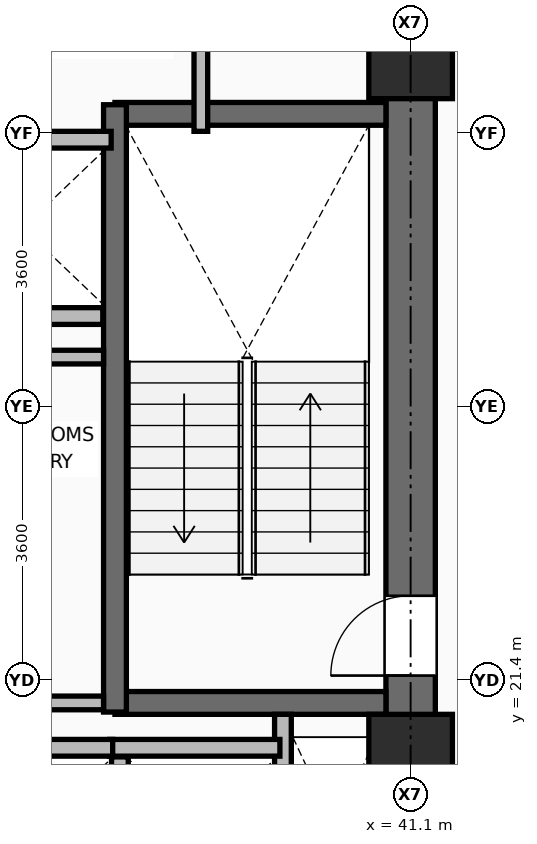
"""IFC4 building model, lengths in metres.
Left out: names, types, materials, properties, quantities, classifications, styles, units other than length and angle.
Written with IfcOpenShell. Run it as: python <this file> out.ifc"""

import sys

from ifc_helpers import new_model, si_unit, direction, frame, frame_2d, origin, origin_2d, place, context, subcontext, project, spatial, rectangle, extrude, element, fill, save


model = new_model("IFC4")
c1 = context("Model", 3, precision=1e-05, world=origin(), true_north=direction((0.0, 1.0)))
c2 = subcontext(c1, "Body", "Model", "MODEL_VIEW")
j1 = project(units=[si_unit("LENGTHUNIT", "METRE"), si_unit("PLANEANGLEUNIT", "RADIAN")], contexts=[c1])
p1 = place(None, origin())
s1 = spatial("IfcSite", under=j1, at=p1, CompositionType="ELEMENT")
p2 = place(p1, origin())
s2 = spatial("IfcBuilding", under=s1, at=p2, CompositionType="ELEMENT")
p3 = place(p2, frame((0.0, 0.0, 49.5)))
s3 = spatial("IfcBuildingStorey", under=s2, at=p3, CompositionType="ELEMENT", Elevation=49.5)
for number, where, z_axis, x_axis in (
    (1, (41.1, 20.4, 0.0), (0.0, 0.0, 1.0), (1.0, 0.0, 0.0)),
    (2, (41.1, 29.6, 0.0), (0.0, 0.0, 1.0), (1.0, 0.0, 0.0)),
):
    element("IfcColumn", number, at=place(p3, frame(where, z_axis=z_axis, x_axis=x_axis)), inside=s3, PredefinedType="COLUMN", context=c2, shape_type="SweptSolid", body=[
        extrude(rectangle(XDim=1.1, YDim=1.1, at=origin_2d()), origin(), (0.0, 0.0, 1.0), 3.75),
    ])
p4 = place(p3, frame((37.275, 18.08, 0.0), z_axis=(0.0, 0.0, 1.0), x_axis=(0.0, 1.0, 0.0)))
e3 = element("IfcWall", 3, at=p4, inside=s3, PredefinedType="PARTITIONING", context=c2, shape_type="SweptSolid", body=[
    extrude(rectangle(XDim=2.31, YDim=0.22, at=frame_2d((1.155, 0.0))), origin(), (0.0, 0.0, 1.0), 3.545),
])
p5 = place(p3, frame((34.91, 26.19, 0.0), z_axis=(0.0, 0.0, 1.0), x_axis=(1.0, 0.0, 0.0)))
e4 = element("IfcWall", 4, at=p5, inside=s3, PredefinedType="PARTITIONING", context=c2, shape_type="SweptSolid", body=[
    extrude(rectangle(XDim=2.14, YDim=0.22, at=frame_2d((1.07, 0.0))), origin(), (0.0, 0.0, 1.0), 3.545),
])
p6 = place(p3, frame((41.1, 18.125, 0.0), z_axis=(0.0, 0.0, 1.0), x_axis=(0.0, 1.0, 0.0)))
e5 = element("IfcWall", 5, at=p6, inside=s3, PredefinedType="SHEAR", context=c2, shape_type="SweptSolid", body=[
    extrude(rectangle(XDim=14.0, YDim=0.65, at=frame_2d((7.0, 0.0))), origin(), (0.0, 0.0, 1.0), 3.57),
])
p7 = place(p6, frame((3.335, 0.0, 0.0)))
e6 = element("IfcOpeningElement", 6, at=p7, cuts=e5, PredefinedType="OPENING", context=c2, shape_type="SweptSolid", body=[
    extrude(rectangle(XDim=1.05, YDim=2.1, at=frame_2d((0.525, 1.05))), frame((0.0, 0.335, 0.0), z_axis=(0.0, -1.0, 0.0), x_axis=(1.0, 0.0, 0.0)), (0.0, 0.0, 1.0), 0.67),
])
for number, where, z_axis, x_axis in (
    (7, (37.21, 21.1, 0.0), (0.0, 0.0, 1.0), (1.0, 0.0, 0.0)),
    (8, (37.21, 28.85, 0.0), (0.0, 0.0, 1.0), (1.0, 0.0, 0.0)),
):
    element("IfcWall", number, at=place(p3, frame(where, z_axis=z_axis, x_axis=x_axis)), inside=s3, PredefinedType="SHEAR", context=c2, shape_type="SweptSolid", body=[
        extrude(rectangle(XDim=3.565, YDim=0.3, at=frame_2d((1.782, 0.0))), origin(), (0.0, 0.0, 1.0), 3.57),
    ])
p8 = place(p3, frame((37.21, 20.98, 0.0), z_axis=(0.0, 0.0, 1.0), x_axis=(0.0, 1.0, 0.0)))
e9 = element("IfcWall", 9, at=p8, inside=s3, PredefinedType="SHEAR", context=c2, shape_type="SweptSolid", body=[
    extrude(rectangle(XDim=7.99, YDim=0.3, at=frame_2d((3.995, 0.0))), origin(), (0.0, 0.0, 1.0), 3.57),
])
p9 = place(p3, frame((39.42, 18.125, 0.0), z_axis=(0.0, 0.0, 1.0), x_axis=(0.0, 1.0, 0.0)))
e10 = element("IfcWall", 10, at=p9, inside=s3, PredefinedType="PARTITIONING", context=c2, shape_type="SweptSolid", body=[
    extrude(rectangle(XDim=2.825, YDim=0.22, at=frame_2d((1.413, 0.0))), origin(), (0.0, 0.0, 1.0), 3.55),
])
for number, where, z_axis, x_axis in (
    (11, (37.14, 20.51, 0.0), (0.0, 0.0, 1.0), (1.0, 0.0, 0.0)),
    (12, (34.94, 20.51, 0.0), (0.0, 0.0, 1.0), (1.0, 0.0, 0.0)),
):
    element("IfcWall", number, at=place(p3, frame(where, z_axis=z_axis, x_axis=x_axis)), inside=s3, PredefinedType="PARTITIONING", context=c2, shape_type="SweptSolid", body=[
        extrude(rectangle(XDim=2.24, YDim=0.22, at=frame_2d((1.12, 0.0))), origin(), (0.0, 0.0, 1.0), 3.55),
    ])
p10 = place(p3, frame((35.56, 28.51, 0.0), z_axis=(0.0, 0.0, 1.0), x_axis=(1.0, 0.0, 0.0)))
e13 = element("IfcWall", 13, at=p10, inside=s3, PredefinedType="PARTITIONING", context=c2, shape_type="SweptSolid", body=[
    extrude(rectangle(XDim=1.6, YDim=0.22, at=frame_2d((0.8, 0.0))), origin(), (0.0, 0.0, 1.0), 3.55),
])
p11 = place(p3, frame((34.98, 21.1, 0.0), z_axis=(0.0, 0.0, 1.0), x_axis=(1.0, 0.0, 0.0)))
e14 = element("IfcWall", 14, at=p11, inside=s3, PredefinedType="PARTITIONING", context=c2, shape_type="SweptSolid", body=[
    extrude(rectangle(XDim=2.08, YDim=0.18, at=frame_2d((1.04, 0.0))), origin(), (0.0, 0.0, 1.0), 3.55),
])
p12 = place(p3, frame((34.72, 25.65, 0.0), z_axis=(0.0, 0.0, 1.0), x_axis=(1.0, 0.0, 0.0)))
e15 = element("IfcWall", 15, at=p12, inside=s3, PredefinedType="PARTITIONING", context=c2, shape_type="SweptSolid", body=[
    extrude(rectangle(XDim=2.34, YDim=0.18, at=frame_2d((1.17, 0.0))), origin(), (0.0, 0.0, 1.0), 3.55),
])
p13 = place(p3, frame((38.34, 28.62, 0.0), z_axis=(0.0, 0.0, 1.0), x_axis=(0.0, 1.0, 0.0)))
e16 = element("IfcWall", 16, at=p13, inside=s3, PredefinedType="PARTITIONING", context=c2, shape_type="SweptSolid", body=[
    extrude(rectangle(XDim=3.505, YDim=0.18, at=frame_2d((1.752, 0.0))), origin(), (0.0, 0.0, 1.0), 3.55),
])
p14 = place(p7, origin())
e17 = element("IfcDoor", 17, at=p14, inside=s3, OperationType="SINGLE_SWING_LEFT", PredefinedType="DOOR", context=c2, shape_type="SweptSolid", body=[
    extrude(rectangle(XDim=1.05, YDim=2.1, at=frame_2d((0.525, 1.05))), frame((0.0, 0.025, 0.0), z_axis=(0.0, -1.0, 0.0), x_axis=(1.0, 0.0, 0.0)), (0.0, 0.0, 1.0), 0.05),
])
fill(e6, e17)
save(model, sys.argv[1])
